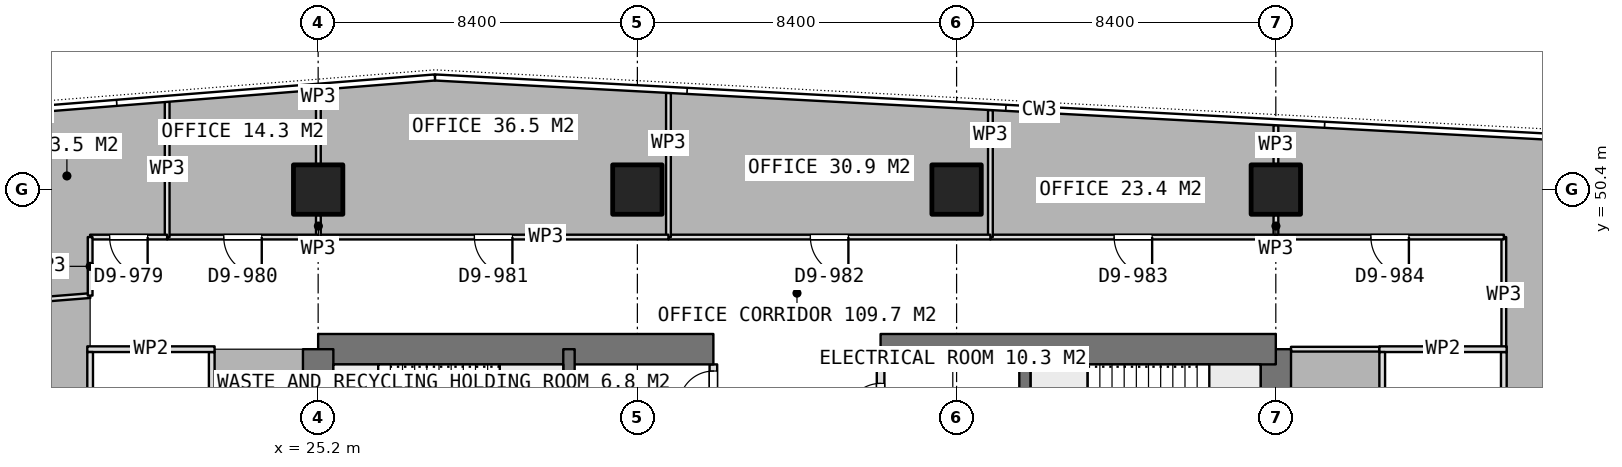
"""IFC4 building model, lengths in metres.
Left out: names, types, materials, properties, quantities, classifications, styles, units other than length and angle.
Written with IfcOpenShell. Run it as: python <this file> out.ifc"""

import sys

from ifc_helpers import new_model, si_unit, direction, frame, frame_2d, origin, origin_2d, place, context, subcontext, project, spatial, rectangle, extrude, element, fill, save


model = new_model("IFC4")
c1 = context("Model", 3, precision=1e-05, world=origin(), true_north=direction((0.0, 1.0)))
c2 = subcontext(c1, "Body", "Model", "MODEL_VIEW")
j1 = project(units=[si_unit("LENGTHUNIT", "METRE"), si_unit("PLANEANGLEUNIT", "RADIAN")], contexts=[c1])
p1 = place(None, origin())
s1 = spatial("IfcSite", under=j1, at=p1, CompositionType="ELEMENT")
p2 = place(p1, origin())
s2 = spatial("IfcBuilding", under=s1, at=p2, CompositionType="ELEMENT")
p3 = place(p2, frame((0.0, 0.0, 261.35)))
s3 = spatial("IfcBuildingStorey", under=s2, at=p3, CompositionType="ELEMENT", Elevation=261.35)
p4 = place(p3, frame((25.2, 46.2, 0.0), z_axis=(0.0, 0.0, 1.0), x_axis=(1.0, 0.0, 0.0)))
e1 = element("IfcWall", 1, at=p4, inside=s3, PredefinedType="SHEAR", context=c2, shape_type="SweptSolid", body=[
    extrude(rectangle(XDim=10.4, YDim=0.8, at=frame_2d((5.2, 0.0))), origin(), (0.0, 0.0, 1.0), 3.75),
])
p5 = place(p3, frame((40.0, 46.2, 0.0), z_axis=(0.0, 0.0, 1.0), x_axis=(1.0, 0.0, 0.0)))
e2 = element("IfcWall", 2, at=p5, inside=s3, PredefinedType="SHEAR", context=c2, shape_type="SweptSolid", body=[
    extrude(rectangle(XDim=10.4, YDim=0.8, at=frame_2d((5.2, 0.0))), origin(), (0.0, 0.0, 1.0), 3.75),
])
p6 = place(p3, frame((25.2, 21.0, 0.0), z_axis=(0.0, 0.0, 1.0), x_axis=(0.0, 1.0, 0.0)))
e3 = element("IfcWall", 3, at=p6, inside=s3, PredefinedType="SHEAR", context=c2, shape_type="SweptSolid", body=[
    extrude(rectangle(XDim=25.2, YDim=0.8, at=frame_2d((12.6, 0.0))), origin(), (0.0, 0.0, 1.0), 3.75),
])
p7 = place(p6, frame((7.8, 0.0, 0.0)))
e4 = element("IfcOpeningElement", 4, at=p7, cuts=e3, PredefinedType="OPENING", context=c2, shape_type="SweptSolid", body=[
    extrude(rectangle(XDim=1.2, YDim=2.1, at=frame_2d((0.6, 1.05))), frame((0.0, 0.41, 0.0), z_axis=(0.0, -1.0, 0.0), x_axis=(1.0, 0.0, 0.0)), (0.0, 0.0, 1.0), 0.82),
])
p8 = place(p6, frame((14.25, 0.0, 0.0)))
e5 = element("IfcOpeningElement", 5, at=p8, cuts=e3, PredefinedType="OPENING", context=c2, shape_type="SweptSolid", body=[
    extrude(rectangle(XDim=0.9, YDim=2.1, at=frame_2d((0.45, 1.05))), frame((0.0, 0.41, 0.0), z_axis=(0.0, -1.0, 0.0), x_axis=(1.0, 0.0, 0.0)), (0.0, 0.0, 1.0), 0.82),
])
p9 = place(p6, frame((16.85, 0.0, 0.0)))
e6 = element("IfcOpeningElement", 6, at=p9, cuts=e3, PredefinedType="OPENING", context=c2, shape_type="SweptSolid", body=[
    extrude(rectangle(XDim=0.9, YDim=2.1, at=frame_2d((0.45, 1.05))), frame((0.0, 0.41, 0.0), z_axis=(0.0, -1.0, 0.0), x_axis=(1.0, 0.0, 0.0)), (0.0, 0.0, 1.0), 0.82),
])
p10 = place(p6, frame((18.95, 0.0, 0.0)))
e7 = element("IfcOpeningElement", 7, at=p10, cuts=e3, PredefinedType="OPENING", context=c2, shape_type="SweptSolid", body=[
    extrude(rectangle(XDim=1.2, YDim=2.1, at=frame_2d((0.6, 1.05))), frame((0.0, 0.41, 0.0), z_axis=(0.0, -1.0, 0.0), x_axis=(1.0, 0.0, 0.0)), (0.0, 0.0, 1.0), 0.82),
])
p11 = place(p3, frame((50.4, 21.0, 0.0), z_axis=(0.0, 0.0, 1.0), x_axis=(0.0, 1.0, 0.0)))
e8 = element("IfcWall", 8, at=p11, inside=s3, PredefinedType="SHEAR", context=c2, shape_type="SweptSolid", body=[
    extrude(rectangle(XDim=25.2, YDim=0.8, at=frame_2d((12.6, 0.0))), origin(), (0.0, 0.0, 1.0), 3.75),
])
p12 = place(p11, frame((16.2, 0.0, 0.0)))
e9 = element("IfcOpeningElement", 9, at=p12, cuts=e8, PredefinedType="OPENING", context=c2, shape_type="SweptSolid", body=[
    extrude(rectangle(XDim=1.2, YDim=2.1, at=frame_2d((0.6, 1.05))), frame((0.0, 0.41, 0.0), z_axis=(0.0, -1.0, 0.0), x_axis=(1.0, 0.0, 0.0)), (0.0, 0.0, 1.0), 0.82),
])
p13 = place(p11, frame((10.05, 0.0, 0.0)))
e10 = element("IfcOpeningElement", 10, at=p13, cuts=e8, PredefinedType="OPENING", context=c2, shape_type="SweptSolid", body=[
    extrude(rectangle(XDim=0.9, YDim=2.1, at=frame_2d((0.45, 1.05))), frame((0.0, 0.41, 0.0), z_axis=(0.0, -1.0, 0.0), x_axis=(1.0, 0.0, 0.0)), (0.0, 0.0, 1.0), 0.82),
])
p14 = place(p11, frame((7.45, 0.0, 0.0)))
e11 = element("IfcOpeningElement", 11, at=p14, cuts=e8, PredefinedType="OPENING", context=c2, shape_type="SweptSolid", body=[
    extrude(rectangle(XDim=0.9, YDim=2.1, at=frame_2d((0.45, 1.05))), frame((0.0, 0.41, 0.0), z_axis=(0.0, -1.0, 0.0), x_axis=(1.0, 0.0, 0.0)), (0.0, 0.0, 1.0), 0.82),
])
p15 = place(p11, frame((0.6, 0.0, 0.0)))
e12 = element("IfcOpeningElement", 12, at=p15, cuts=e8, PredefinedType="OPENING", context=c2, shape_type="SweptSolid", body=[
    extrude(rectangle(XDim=1.2, YDim=2.1, at=frame_2d((0.6, 1.05))), frame((0.0, 0.41, 0.0), z_axis=(0.0, -1.0, 0.0), x_axis=(1.0, 0.0, 0.0)), (0.0, 0.0, 1.0), 0.82),
])
for number, where, z_axis, x_axis in (
    (13, (31.8, 21.0, 0.0), (0.0, 0.0, 1.0), (0.0, 1.0, 0.0)),
    (14, (43.8, 21.0, 0.0), (0.0, 0.0, 1.0), (0.0, 1.0, 0.0)),
):
    element("IfcWall", number, at=place(p3, frame(where, z_axis=z_axis, x_axis=x_axis)), inside=s3, PredefinedType="SHEAR", context=c2, shape_type="SweptSolid", body=[
        extrude(rectangle(XDim=25.2, YDim=0.3, at=frame_2d((12.6, 0.0))), origin(), (0.0, 0.0, 1.0), 3.75),
    ])
for number, where, z_axis, x_axis in (
    (15, (25.2, 50.4, 0.0), (0.0, 0.0, 1.0), (1.0, 0.0, 0.0)),
    (16, (33.6, 50.4, 0.0), (0.0, 0.0, 1.0), (1.0, 0.0, 0.0)),
    (17, (42.0, 50.4, 0.0), (0.0, 0.0, 1.0), (1.0, 0.0, 0.0)),
    (18, (50.4, 50.4, 0.0), (0.0, 0.0, 1.0), (1.0, 0.0, 0.0)),
):
    element("IfcColumn", number, at=place(p3, frame(where, z_axis=z_axis, x_axis=x_axis)), inside=s3, PredefinedType="COLUMN", context=c2, shape_type="SweptSolid", body=[
        extrude(rectangle(XDim=1.3, YDim=1.3, at=origin_2d()), origin(), (0.0, 0.0, 1.0), 3.75),
    ])
p16 = place(p3, frame((40.0, 41.55, 0.0), z_axis=(0.0, 0.0, 1.0), x_axis=(0.0, 1.0, 0.0)))
e19 = element("IfcWall", 19, at=p16, inside=s3, PredefinedType="PARTITIONING", context=c2, shape_type="SweptSolid", body=[
    extrude(rectangle(XDim=4.25, YDim=0.2, at=frame_2d((2.125, 0.0))), origin(), (0.0, 0.0, 1.0), 3.5),
])
p17 = place(p16, frame((2.85, 0.0, 0.0)))
e20 = element("IfcOpeningElement", 20, at=p17, cuts=e19, PredefinedType="OPENING", context=c2, shape_type="SweptSolid", body=[
    extrude(rectangle(XDim=0.9, YDim=2.1, at=frame_2d((0.45, 1.05))), frame((0.0, 0.11, 0.0), z_axis=(0.0, -1.0, 0.0), x_axis=(1.0, 0.0, 0.0)), (0.0, 0.0, 1.0), 0.22),
])
p18 = place(p16, frame((0.4, 0.0, 0.0)))
e21 = element("IfcOpeningElement", 21, at=p18, cuts=e19, PredefinedType="OPENING", context=c2, shape_type="SweptSolid", body=[
    extrude(rectangle(XDim=1.0, YDim=2.1, at=frame_2d((0.5, 1.05))), frame((0.0, 0.11, 0.0), z_axis=(0.0, -1.0, 0.0), x_axis=(1.0, 0.0, 0.0)), (0.0, 0.0, 1.0), 0.22),
])
p19 = place(p3, frame((35.6, 41.55, 0.0), z_axis=(0.0, 0.0, 1.0), x_axis=(0.0, 1.0, 0.0)))
e22 = element("IfcWall", 22, at=p19, inside=s3, PredefinedType="PARTITIONING", context=c2, shape_type="SweptSolid", body=[
    extrude(rectangle(XDim=4.25, YDim=0.2, at=frame_2d((2.125, 0.0))), origin(), (0.0, 0.0, 1.0), 3.5),
])
p20 = place(p19, frame((3.175, 0.0, 0.0)))
e23 = element("IfcOpeningElement", 23, at=p20, cuts=e22, PredefinedType="OPENING", context=c2, shape_type="SweptSolid", body=[
    extrude(rectangle(XDim=0.9, YDim=2.1, at=frame_2d((0.45, 1.05))), frame((0.0, 0.11, 0.0), z_axis=(0.0, -1.0, 0.0), x_axis=(1.0, 0.0, 0.0)), (0.0, 0.0, 1.0), 0.22),
])
p21 = place(p19, frame((0.8, 0.0, 0.0)))
e24 = element("IfcOpeningElement", 24, at=p21, cuts=e22, PredefinedType="OPENING", context=c2, shape_type="SweptSolid", body=[
    extrude(rectangle(XDim=1.1, YDim=2.1, at=frame_2d((0.55, 1.05))), frame((0.0, 0.11, 0.0), z_axis=(0.0, -1.0, 0.0), x_axis=(1.0, 0.0, 0.0)), (0.0, 0.0, 1.0), 0.22),
])
p22 = place(p3, frame((53.125, 46.2, 0.0), z_axis=(0.0, 0.0, 1.0), x_axis=(1.0, 0.0, 0.0)))
e25 = element("IfcWall", 25, at=p22, inside=s3, PredefinedType="PARTITIONING", context=c2, shape_type="SweptSolid", body=[
    extrude(rectangle(XDim=3.35, YDim=0.15, at=frame_2d((1.675, 0.0))), origin(), (0.0, 0.0, 1.0), 3.5),
])
p23 = place(p3, frame((53.2, 39.275, 0.0), z_axis=(0.0, 0.0, 1.0), x_axis=(0.0, 1.0, 0.0)))
e26 = element("IfcWall", 26, at=p23, inside=s3, PredefinedType="PARTITIONING", context=c2, shape_type="SweptSolid", body=[
    extrude(rectangle(XDim=6.85, YDim=0.15, at=frame_2d((3.425, 0.0))), origin(), (0.0, 0.0, 1.0), 3.5),
])
p24 = place(p23, frame((2.925, 0.0, 0.0)))
e27 = element("IfcOpeningElement", 27, at=p24, cuts=e26, PredefinedType="OPENING", context=c2, shape_type="SweptSolid", body=[
    extrude(rectangle(XDim=1.0, YDim=2.1, at=frame_2d((0.5, 1.05))), frame((0.0, 0.085, 0.0), z_axis=(0.0, -1.0, 0.0), x_axis=(1.0, 0.0, 0.0)), (0.0, 0.0, 1.0), 0.17),
])
p25 = place(p3, frame((56.4, 39.275, 0.0), z_axis=(0.0, 0.0, 1.0), x_axis=(0.0, 1.0, 0.0)))
e28 = element("IfcWall", 28, at=p25, inside=s3, PredefinedType="PARTITIONING", context=c2, shape_type="SweptSolid", body=[
    extrude(rectangle(XDim=6.85, YDim=0.15, at=frame_2d((3.425, 0.0))), origin(), (0.0, 0.0, 1.0), 3.5),
])
p26 = place(p3, frame((19.125, 46.2, 0.0), z_axis=(0.0, 0.0, 1.0), x_axis=(1.0, 0.0, 0.0)))
e29 = element("IfcWall", 29, at=p26, inside=s3, PredefinedType="PARTITIONING", context=c2, shape_type="SweptSolid", body=[
    extrude(rectangle(XDim=3.35, YDim=0.15, at=frame_2d((1.675, 0.0))), origin(), (0.0, 0.0, 1.0), 3.5),
])
p27 = place(p3, frame((19.2, 39.275, 0.0), z_axis=(0.0, 0.0, 1.0), x_axis=(0.0, 1.0, 0.0)))
e30 = element("IfcWall", 30, at=p27, inside=s3, PredefinedType="PARTITIONING", context=c2, shape_type="SweptSolid", body=[
    extrude(rectangle(XDim=6.85, YDim=0.15, at=frame_2d((3.425, 0.0))), origin(), (0.0, 0.0, 1.0), 3.5),
])
p28 = place(p3, frame((22.4, 39.275, 0.0), z_axis=(0.0, 0.0, 1.0), x_axis=(0.0, 1.0, 0.0)))
e31 = element("IfcWall", 31, at=p28, inside=s3, PredefinedType="PARTITIONING", context=c2, shape_type="SweptSolid", body=[
    extrude(rectangle(XDim=6.85, YDim=0.15, at=frame_2d((3.425, 0.0))), origin(), (0.0, 0.0, 1.0), 3.5),
])
p29 = place(p28, frame((2.925, 0.0, 0.0)))
e32 = element("IfcOpeningElement", 32, at=p29, cuts=e31, PredefinedType="OPENING", context=c2, shape_type="SweptSolid", body=[
    extrude(rectangle(XDim=1.0, YDim=2.1, at=frame_2d((0.5, 1.05))), frame((0.0, 0.085, 0.0), z_axis=(0.0, -1.0, 0.0), x_axis=(1.0, 0.0, 0.0)), (0.0, 0.0, 1.0), 0.17),
])
p30 = place(p3, frame((50.8, 46.2, 0.0), z_axis=(0.0, 0.0, 1.0), x_axis=(1.0, 0.0, 0.0)))
e33 = element("IfcWall", 33, at=p30, inside=s3, PredefinedType="PARTITIONING", context=c2, shape_type="SweptSolid", body=[
    extrude(rectangle(XDim=2.324, YDim=0.125, at=frame_2d((1.162, 0.0))), origin(), (0.0, 0.0, 1.0), 3.5),
])
p31 = place(p3, frame((50.403, 49.15, 0.0), z_axis=(0.0, 0.0, 1.0), x_axis=(0.0, 1.0, 0.0)))
e34 = element("IfcWall", 34, at=p31, inside=s3, PredefinedType="PARTITIONING", context=c2, shape_type="SweptSolid", body=[
    extrude(rectangle(XDim=0.58, YDim=0.125, at=frame_2d((0.29, 0.0))), origin(), (0.0, 0.0, 1.0), 3.5),
])
p32 = place(p3, frame((50.403, 51.07, 0.0), z_axis=(0.0, 0.0, 1.0), x_axis=(0.0, 1.0, 0.0)))
e35 = element("IfcWall", 35, at=p32, inside=s3, PredefinedType="PARTITIONING", context=c2, shape_type="SweptSolid", body=[
    extrude(rectangle(XDim=1.024, YDim=0.125, at=frame_2d((0.512, 0.0))), origin(), (0.0, 0.0, 1.0), 3.5),
])
p33 = place(p3, frame((56.4, 46.125, 0.0), z_axis=(0.0, 0.0, 1.0), x_axis=(0.0, 1.0, 0.0)))
e36 = element("IfcWall", 36, at=p33, inside=s3, PredefinedType="PARTITIONING", context=c2, shape_type="SweptSolid", body=[
    extrude(rectangle(XDim=3.025, YDim=0.125, at=frame_2d((1.512, 0.0))), origin(), (0.0, 0.0, 1.0), 3.5),
])
p34 = place(p3, frame((56.4, 49.15, 0.0), z_axis=(0.0, 0.0, 1.0), x_axis=(-1.0, 0.0, 0.0)))
e37 = element("IfcWall", 37, at=p34, inside=s3, PredefinedType="PARTITIONING", context=c2, shape_type="SweptSolid", body=[
    extrude(rectangle(XDim=5.997, YDim=0.125, at=frame_2d((2.999, 0.0))), origin(), (0.0, 0.0, 1.0), 3.5),
])
p35 = place(p34, frame((2.498, 0.0, 0.0)))
e38 = element("IfcOpeningElement", 38, at=p35, cuts=e37, PredefinedType="OPENING", context=c2, shape_type="SweptSolid", body=[
    extrude(rectangle(XDim=1.0, YDim=2.1, at=frame_2d((0.5, 1.05))), frame((0.0, 0.073, 0.0), z_axis=(0.0, -1.0, 0.0), x_axis=(1.0, 0.0, 0.0)), (0.0, 0.0, 1.0), 0.145),
])
p36 = place(p3, frame((50.402, 49.15, 0.0), z_axis=(0.0, 0.0, 1.0), x_axis=(-1.0, 0.0, 0.0)))
e39 = element("IfcWall", 39, at=p36, inside=s3, PredefinedType="PARTITIONING", context=c2, shape_type="SweptSolid", body=[
    extrude(rectangle(XDim=7.512, YDim=0.125, at=frame_2d((3.756, 0.0))), origin(), (0.0, 0.0, 1.0), 3.5),
])
p37 = place(p36, frame((3.256, 0.0, 0.0)))
e40 = element("IfcOpeningElement", 40, at=p37, cuts=e39, PredefinedType="OPENING", context=c2, shape_type="SweptSolid", body=[
    extrude(rectangle(XDim=1.0, YDim=2.1, at=frame_2d((0.5, 1.05))), frame((0.0, 0.073, 0.0), z_axis=(0.0, -1.0, 0.0), x_axis=(1.0, 0.0, 0.0)), (0.0, 0.0, 1.0), 0.145),
])
p38 = place(p3, frame((42.89, 49.15, 0.0), z_axis=(0.0, 0.0, 1.0), x_axis=(0.0, 1.0, 0.0)))
e41 = element("IfcWall", 41, at=p38, inside=s3, PredefinedType="PARTITIONING", context=c2, shape_type="SweptSolid", body=[
    extrude(rectangle(XDim=3.343, YDim=0.125, at=frame_2d((1.671, 0.0))), origin(), (0.0, 0.0, 1.0), 3.5),
])
p39 = place(p3, frame((42.889, 49.15, 0.0), z_axis=(0.0, 0.0, 1.0), x_axis=(-1.0, 0.0, 0.0)))
e42 = element("IfcWall", 42, at=p39, inside=s3, PredefinedType="PARTITIONING", context=c2, shape_type="SweptSolid", body=[
    extrude(rectangle(XDim=8.471, YDim=0.125, at=frame_2d((4.235, 0.0))), origin(), (0.0, 0.0, 1.0), 3.5),
])
p40 = place(p39, frame((3.736, 0.0, 0.0)))
e43 = element("IfcOpeningElement", 43, at=p40, cuts=e42, PredefinedType="OPENING", context=c2, shape_type="SweptSolid", body=[
    extrude(rectangle(XDim=1.0, YDim=2.1, at=frame_2d((0.5, 1.05))), frame((0.0, 0.073, 0.0), z_axis=(0.0, -1.0, 0.0), x_axis=(1.0, 0.0, 0.0)), (0.0, 0.0, 1.0), 0.145),
])
p41 = place(p3, frame((34.418, 49.15, 0.0), z_axis=(0.0, 0.0, 1.0), x_axis=(0.0, 1.0, 0.0)))
e44 = element("IfcWall", 44, at=p41, inside=s3, PredefinedType="PARTITIONING", context=c2, shape_type="SweptSolid", body=[
    extrude(rectangle(XDim=3.793, YDim=0.125, at=frame_2d((1.896, 0.0))), origin(), (0.0, 0.0, 1.0), 3.5),
])
p42 = place(p3, frame((34.417, 49.15, 0.0), z_axis=(0.0, 0.0, 1.0), x_axis=(-1.0, 0.0, 0.0)))
e45 = element("IfcWall", 45, at=p42, inside=s3, PredefinedType="PARTITIONING", context=c2, shape_type="SweptSolid", body=[
    extrude(rectangle(XDim=9.211, YDim=0.125, at=frame_2d((4.605, 0.0))), origin(), (0.0, 0.0, 1.0), 3.5),
])
p43 = place(p42, frame((4.105, 0.0, 0.0)))
e46 = element("IfcOpeningElement", 46, at=p43, cuts=e45, PredefinedType="OPENING", context=c2, shape_type="SweptSolid", body=[
    extrude(rectangle(XDim=1.0, YDim=2.1, at=frame_2d((0.5, 1.05))), frame((0.0, 0.073, 0.0), z_axis=(0.0, -1.0, 0.0), x_axis=(1.0, 0.0, 0.0)), (0.0, 0.0, 1.0), 0.145),
])
p44 = place(p3, frame((25.206, 49.15, 0.0), z_axis=(0.0, 0.0, 1.0), x_axis=(0.0, 1.0, 0.0)))
e47 = element("IfcWall", 47, at=p44, inside=s3, PredefinedType="PARTITIONING", context=c2, shape_type="SweptSolid", body=[
    extrude(rectangle(XDim=0.58, YDim=0.125, at=frame_2d((0.29, 0.0))), origin(), (0.0, 0.0, 1.0), 3.5),
])
p45 = place(p3, frame((25.206, 51.07, 0.0), z_axis=(0.0, 0.0, 1.0), x_axis=(0.0, 1.0, 0.0)))
e48 = element("IfcWall", 48, at=p45, inside=s3, PredefinedType="PARTITIONING", context=c2, shape_type="SweptSolid", body=[
    extrude(rectangle(XDim=1.955, YDim=0.125, at=frame_2d((0.978, 0.0))), origin(), (0.0, 0.0, 1.0), 3.5),
])
p46 = place(p3, frame((25.205, 49.15, 0.0), z_axis=(0.0, 0.0, 1.0), x_axis=(-1.0, 0.0, 0.0)))
e49 = element("IfcWall", 49, at=p46, inside=s3, PredefinedType="PARTITIONING", context=c2, shape_type="SweptSolid", body=[
    extrude(rectangle(XDim=3.978, YDim=0.125, at=frame_2d((1.989, 0.0))), origin(), (0.0, 0.0, 1.0), 3.5),
])
p47 = place(p46, frame((1.489, 0.0, 0.0)))
e50 = element("IfcOpeningElement", 50, at=p47, cuts=e49, PredefinedType="OPENING", context=c2, shape_type="SweptSolid", body=[
    extrude(rectangle(XDim=1.0, YDim=2.1, at=frame_2d((0.5, 1.05))), frame((0.0, 0.073, 0.0), z_axis=(0.0, -1.0, 0.0), x_axis=(1.0, 0.0, 0.0)), (0.0, 0.0, 1.0), 0.145),
])
p48 = place(p3, frame((21.227, 49.15, 0.0), z_axis=(0.0, 0.0, 1.0), x_axis=(0.0, 1.0, 0.0)))
e51 = element("IfcWall", 51, at=p48, inside=s3, PredefinedType="PARTITIONING", context=c2, shape_type="SweptSolid", body=[
    extrude(rectangle(XDim=3.558, YDim=0.125, at=frame_2d((1.779, 0.0))), origin(), (0.0, 0.0, 1.0), 3.5),
])
p49 = place(p3, frame((19.2, 47.61, 0.0), z_axis=(0.0, 0.0, 1.0), x_axis=(-0.99683691537, -0.079474298708, 0.0)))
e52 = element("IfcWall", 52, at=p49, inside=s3, PredefinedType="PARTITIONING", context=c2, shape_type="SweptSolid", body=[
    extrude(rectangle(XDim=3.259, YDim=0.125, at=frame_2d((1.63, 0.0))), origin(), (0.0, 0.0, 1.0), 3.5),
])
p50 = place(p3, frame((21.226, 49.15, 0.0), z_axis=(0.0, 0.0, 1.0), x_axis=(-1.0, 0.0, 0.0)))
e53 = element("IfcWall", 53, at=p50, inside=s3, PredefinedType="PARTITIONING", context=c2, shape_type="SweptSolid", body=[
    extrude(rectangle(XDim=2.026, YDim=0.125, at=frame_2d((1.013, 0.0))), origin(), (0.0, 0.0, 1.0), 3.5),
])
p51 = place(p50, frame((0.513, 0.0, 0.0)))
e54 = element("IfcOpeningElement", 54, at=p51, cuts=e53, PredefinedType="OPENING", context=c2, shape_type="SweptSolid", body=[
    extrude(rectangle(XDim=1.0, YDim=2.1, at=frame_2d((0.5, 1.05))), frame((0.0, 0.073, 0.0), z_axis=(0.0, -1.0, 0.0), x_axis=(1.0, 0.0, 0.0)), (0.0, 0.0, 1.0), 0.145),
])
p52 = place(p3, frame((19.2, 49.15, 0.0), z_axis=(0.0, 0.0, 1.0), x_axis=(0.0, -1.0, 0.0)))
e55 = element("IfcWall", 55, at=p52, inside=s3, PredefinedType="PARTITIONING", context=c2, shape_type="SweptSolid", body=[
    extrude(rectangle(XDim=1.54, YDim=0.125, at=frame_2d((0.77, 0.0))), origin(), (0.0, 0.0, 1.0), 3.5),
])
p53 = place(p17, origin())
e56 = element("IfcDoor", 56, at=p53, inside=s3, OperationType="SINGLE_SWING_LEFT", PredefinedType="DOOR", context=c2, shape_type="SweptSolid", body=[
    extrude(rectangle(XDim=0.9, YDim=2.1, at=frame_2d((0.45, 1.05))), frame((0.0, 0.025, 0.0), z_axis=(0.0, -1.0, 0.0), x_axis=(1.0, 0.0, 0.0)), (0.0, 0.0, 1.0), 0.05),
])
fill(e20, e56)
p54 = place(p20, origin())
e57 = element("IfcDoor", 57, at=p54, inside=s3, OperationType="SINGLE_SWING_LEFT", PredefinedType="DOOR", context=c2, shape_type="SweptSolid", body=[
    extrude(rectangle(XDim=0.9, YDim=2.1, at=frame_2d((0.45, 1.05))), frame((0.0, 0.025, 0.0), z_axis=(0.0, -1.0, 0.0), x_axis=(1.0, 0.0, 0.0)), (0.0, 0.0, 1.0), 0.05),
])
fill(e23, e57)
p55 = place(p35, origin())
e58 = element("IfcDoor", 58, at=p55, inside=s3, OperationType="SINGLE_SWING_LEFT", PredefinedType="DOOR", context=c2, shape_type="SweptSolid", body=[
    extrude(rectangle(XDim=1.0, YDim=2.1, at=frame_2d((0.5, 1.05))), frame((0.0, 0.025, 0.0), z_axis=(0.0, -1.0, 0.0), x_axis=(1.0, 0.0, 0.0)), (0.0, 0.0, 1.0), 0.05),
])
fill(e38, e58)
p56 = place(p37, origin())
e59 = element("IfcDoor", 59, at=p56, inside=s3, OperationType="SINGLE_SWING_LEFT", PredefinedType="DOOR", context=c2, shape_type="SweptSolid", body=[
    extrude(rectangle(XDim=1.0, YDim=2.1, at=frame_2d((0.5, 1.05))), frame((0.0, 0.025, 0.0), z_axis=(0.0, -1.0, 0.0), x_axis=(1.0, 0.0, 0.0)), (0.0, 0.0, 1.0), 0.05),
])
fill(e40, e59)
p57 = place(p40, origin())
e60 = element("IfcDoor", 60, at=p57, inside=s3, OperationType="SINGLE_SWING_LEFT", PredefinedType="DOOR", context=c2, shape_type="SweptSolid", body=[
    extrude(rectangle(XDim=1.0, YDim=2.1, at=frame_2d((0.5, 1.05))), frame((0.0, 0.025, 0.0), z_axis=(0.0, -1.0, 0.0), x_axis=(1.0, 0.0, 0.0)), (0.0, 0.0, 1.0), 0.05),
])
fill(e43, e60)
p58 = place(p43, origin())
e61 = element("IfcDoor", 61, at=p58, inside=s3, OperationType="SINGLE_SWING_LEFT", PredefinedType="DOOR", context=c2, shape_type="SweptSolid", body=[
    extrude(rectangle(XDim=1.0, YDim=2.1, at=frame_2d((0.5, 1.05))), frame((0.0, 0.025, 0.0), z_axis=(0.0, -1.0, 0.0), x_axis=(1.0, 0.0, 0.0)), (0.0, 0.0, 1.0), 0.05),
])
fill(e46, e61)
p59 = place(p47, origin())
e62 = element("IfcDoor", 62, at=p59, inside=s3, OperationType="SINGLE_SWING_LEFT", PredefinedType="DOOR", context=c2, shape_type="SweptSolid", body=[
    extrude(rectangle(XDim=1.0, YDim=2.1, at=frame_2d((0.5, 1.05))), frame((0.0, 0.025, 0.0), z_axis=(0.0, -1.0, 0.0), x_axis=(1.0, 0.0, 0.0)), (0.0, 0.0, 1.0), 0.05),
])
fill(e50, e62)
p60 = place(p51, origin())
e63 = element("IfcDoor", 63, at=p60, inside=s3, OperationType="SINGLE_SWING_LEFT", PredefinedType="DOOR", context=c2, shape_type="SweptSolid", body=[
    extrude(rectangle(XDim=1.0, YDim=2.1, at=frame_2d((0.5, 1.05))), frame((0.0, 0.025, 0.0), z_axis=(0.0, -1.0, 0.0), x_axis=(1.0, 0.0, 0.0)), (0.0, 0.0, 1.0), 0.05),
])
fill(e54, e63)
save(model, sys.argv[1])
